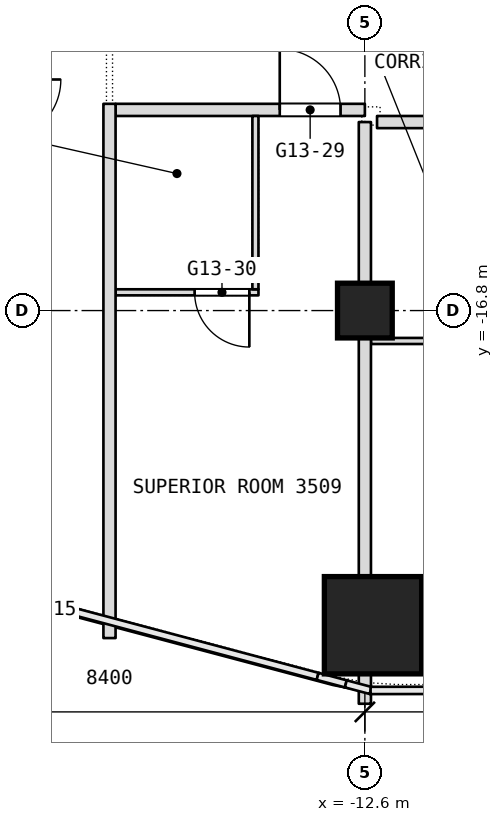
"""IFC4 building model, lengths in metres.
Left out: names, types, materials, properties, quantities, classifications, styles, units other than length and angle.
Written with IfcOpenShell. Run it as: python <this file> out.ifc"""

import sys

from ifc_helpers import new_model, si_unit, direction, frame, frame_2d, origin, origin_2d, place, context, subcontext, project, spatial, rectangle, extrude, element, fill, save


model = new_model("IFC4")
c1 = context("Model", 3, precision=1e-05, world=origin(), true_north=direction((0.0, 1.0)))
c2 = subcontext(c1, "Body", "Model", "MODEL_VIEW")
j1 = project(units=[si_unit("LENGTHUNIT", "METRE"), si_unit("PLANEANGLEUNIT", "RADIAN")], contexts=[c1])
p1 = place(None, origin())
s1 = spatial("IfcSite", under=j1, at=p1, CompositionType="ELEMENT")
p2 = place(p1, origin())
s2 = spatial("IfcBuilding", under=s1, at=p2, CompositionType="ELEMENT")
p3 = place(p2, frame((0.0, 0.0, 151.7)))
s3 = spatial("IfcBuildingStorey", under=s2, at=p3, CompositionType="ELEMENT", Elevation=151.7)
p4 = place(p3, frame((-12.466, -21.975, 0.0), z_axis=(0.0, 0.0, 1.0), x_axis=(1.0, 0.0, 0.0)))
e1 = element("IfcColumn", 1, at=p4, inside=s3, PredefinedType="COLUMN", context=c2, shape_type="SweptSolid", body=[
    extrude(rectangle(XDim=1.6, YDim=1.6, at=origin_2d()), origin(), (0.0, 0.0, 1.0), 3.6),
])
p5 = place(p3, frame((-12.6, -16.8, 0.0), z_axis=(0.0, 0.0, 1.0), x_axis=(1.0, 0.0, 0.0)))
e2 = element("IfcColumn", 2, at=p5, inside=s3, PredefinedType="COLUMN", context=c2, shape_type="SweptSolid", body=[
    extrude(rectangle(XDim=0.9, YDim=0.9, at=origin_2d()), origin(), (0.0, 0.0, 1.0), 3.6),
])
p6 = place(p3, frame((-12.5, -17.3, 0.0), z_axis=(0.0, 0.0, 1.0), x_axis=(1.0, 0.0, 0.0)))
e3 = element("IfcWall", 3, at=p6, inside=s3, PredefinedType="PARTITIONING", context=c2, shape_type="SweptSolid", body=[
    extrude(rectangle(XDim=2.35, YDim=0.1, at=frame_2d((1.175, 0.0))), origin(), (0.0, 0.0, 1.0), 3.34),
])
p7 = place(p6, frame((1.3, 0.0, 0.0)))
e4 = element("IfcOpeningElement", 4, at=p7, cuts=e3, PredefinedType="OPENING", context=c2, shape_type="SweptSolid", body=[
    extrude(rectangle(XDim=0.9, YDim=2.1, at=frame_2d((0.45, 1.05))), frame((0.0, 0.05, 0.0), z_axis=(0.0, -1.0, 0.0), x_axis=(1.0, 0.0, 0.0)), (0.0, 0.0, 1.0), 0.1),
])
p8 = place(p3, frame((-16.7, -16.5, 0.0), z_axis=(0.0, 0.0, 1.0), x_axis=(1.0, 0.0, 0.0)))
e5 = element("IfcWall", 5, at=p8, inside=s3, PredefinedType="PARTITIONING", context=c2, shape_type="SweptSolid", body=[
    extrude(rectangle(XDim=2.35, YDim=0.1, at=frame_2d((1.175, 0.0))), origin(), (0.0, 0.0, 1.0), 3.34),
])
p9 = place(p8, frame((1.3, 0.0, 0.0)))
e6 = element("IfcOpeningElement", 6, at=p9, cuts=e5, PredefinedType="OPENING", context=c2, shape_type="SweptSolid", body=[
    extrude(rectangle(XDim=0.9, YDim=2.1, at=frame_2d((0.45, 1.05))), frame((0.0, 0.05, 0.0), z_axis=(0.0, -1.0, 0.0), x_axis=(1.0, 0.0, 0.0)), (0.0, 0.0, 1.0), 0.1),
])
p10 = place(p3, frame((-12.4, -13.7, 0.0), z_axis=(0.0, 0.0, 1.0), x_axis=(1.0, 0.0, 0.0)))
e7 = element("IfcWall", 7, at=p10, inside=s3, PredefinedType="PARTITIONING", context=c2, shape_type="SweptSolid", body=[
    extrude(rectangle(XDim=9.2, YDim=0.2, at=frame_2d((4.6, 0.0))), origin(), (0.0, 0.0, 1.0), 3.34),
])
p11 = place(p10, frame((3.4, 0.0, 0.0)))
e8 = element("IfcOpeningElement", 8, at=p11, cuts=e7, PredefinedType="OPENING", context=c2, shape_type="SweptSolid", body=[
    extrude(rectangle(XDim=1.1, YDim=2.1, at=frame_2d((0.55, 1.05))), frame((0.0, 0.1, 0.0), z_axis=(0.0, -1.0, 0.0), x_axis=(1.0, 0.0, 0.0)), (0.0, 0.0, 1.0), 0.2),
])
p12 = place(p3, frame((-16.7, -13.5, 0.0), z_axis=(0.0, 0.0, 1.0), x_axis=(1.0, 0.0, 0.0)))
e9 = element("IfcWall", 9, at=p12, inside=s3, PredefinedType="PARTITIONING", context=c2, shape_type="SweptSolid", body=[
    extrude(rectangle(XDim=4.1, YDim=0.2, at=frame_2d((2.05, 0.0))), origin(), (0.0, 0.0, 1.0), 3.34),
])
p13 = place(p12, frame((2.7, 0.0, 0.0)))
e10 = element("IfcOpeningElement", 10, at=p13, cuts=e9, PredefinedType="OPENING", context=c2, shape_type="SweptSolid", body=[
    extrude(rectangle(XDim=1.0, YDim=2.1, at=frame_2d((0.5, 1.05))), frame((0.0, 0.1, 0.0), z_axis=(0.0, -1.0, 0.0), x_axis=(1.0, 0.0, 0.0)), (0.0, 0.0, 1.0), 0.2),
])
p14 = place(p3, frame((-12.6, -23.266, 0.0), z_axis=(0.0, 0.0, 1.0), x_axis=(0.0, 1.0, 0.0)))
e11 = element("IfcWall", 11, at=p14, inside=s3, PredefinedType="PARTITIONING", context=c2, shape_type="SweptSolid", body=[
    extrude(rectangle(XDim=0.491, YDim=0.2, at=frame_2d((0.246, 0.0))), origin(), (0.0, 0.0, 1.0), 3.34),
])
p15 = place(p3, frame((-12.6, -21.175, 0.0), z_axis=(0.0, 0.0, 1.0), x_axis=(0.0, 1.0, 0.0)))
e12 = element("IfcWall", 12, at=p15, inside=s3, PredefinedType="PARTITIONING", context=c2, shape_type="SweptSolid", body=[
    extrude(rectangle(XDim=7.475, YDim=0.2, at=frame_2d((3.738, 0.0))), origin(), (0.0, 0.0, 1.0), 3.34),
])
p16 = place(p3, frame((-14.4, -16.45, 0.0), z_axis=(0.0, 0.0, 1.0), x_axis=(0.0, 1.0, 0.0)))
e13 = element("IfcWall", 13, at=p16, inside=s3, PredefinedType="PARTITIONING", context=c2, shape_type="SweptSolid", body=[
    extrude(rectangle(XDim=2.85, YDim=0.1, at=frame_2d((1.425, 0.0))), origin(), (0.0, 0.0, 1.0), 3.34),
])
p17 = place(p3, frame((-16.8, -22.186, 0.0), z_axis=(0.0, 0.0, 1.0), x_axis=(0.0, 1.0, 0.0)))
e14 = element("IfcWall", 14, at=p17, inside=s3, PredefinedType="PARTITIONING", context=c2, shape_type="SweptSolid", body=[
    extrude(rectangle(XDim=8.786, YDim=0.2, at=frame_2d((4.393, 0.0))), origin(), (0.0, 0.0, 1.0), 3.34),
])
p18 = place(p9, origin())
e15 = element("IfcDoor", 15, at=p18, inside=s3, OperationType="SINGLE_SWING_RIGHT", PredefinedType="DOOR", context=c2, shape_type="SweptSolid", body=[
    extrude(rectangle(XDim=0.9, YDim=2.1, at=frame_2d((0.45, 1.05))), frame((0.0, 0.025, 0.0), z_axis=(0.0, -1.0, 0.0), x_axis=(1.0, 0.0, 0.0)), (0.0, 0.0, 1.0), 0.05),
])
fill(e6, e15)
p19 = place(p13, origin())
e16 = element("IfcDoor", 16, at=p19, inside=s3, OperationType="SINGLE_SWING_LEFT", PredefinedType="DOOR", context=c2, shape_type="SweptSolid", body=[
    extrude(rectangle(XDim=1.0, YDim=2.1, at=frame_2d((0.5, 1.05))), frame((0.0, 0.025, 0.0), z_axis=(0.0, -1.0, 0.0), x_axis=(1.0, 0.0, 0.0)), (0.0, 0.0, 1.0), 0.05),
])
fill(e10, e16)
save(model, sys.argv[1])
